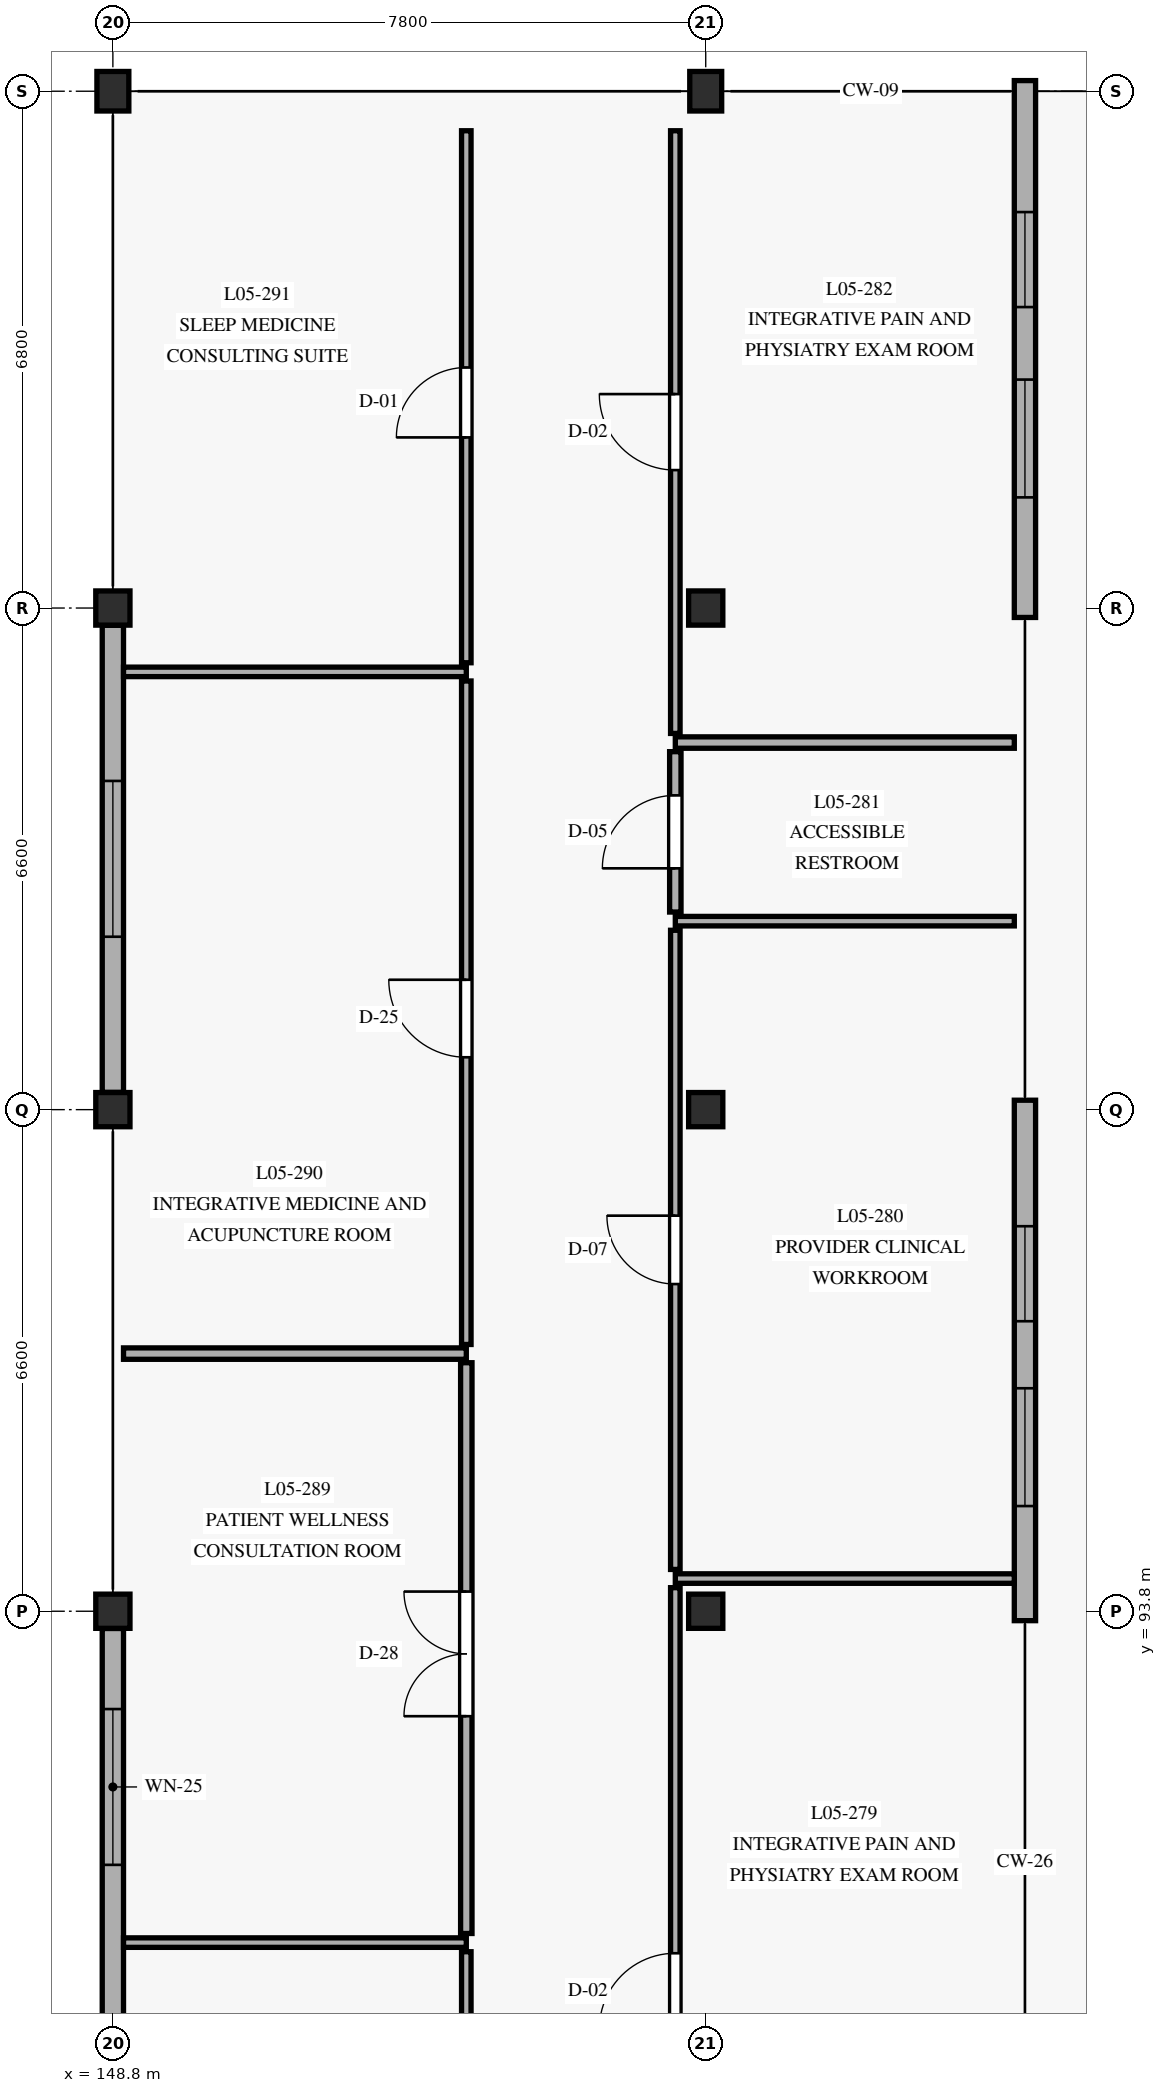
"""IFC4 building model, lengths in metres.
Left out: names, types, materials, properties, quantities, classifications, styles, units other than length and angle.
Written with IfcOpenShell. Run it as: python <this file> out.ifc"""

import sys

from ifc_helpers import new_model, si_unit, direction, frame, frame_2d, origin, origin_with_axes, origin_2d, place, context, subcontext, project, spatial, rectangle, extrude, element, fill, save


model = new_model("IFC4")
c1 = context("Model", 3, precision=1e-05, world=origin(), true_north=direction((0.0, 1.0)))
c2 = subcontext(c1, "Body", "Model", "MODEL_VIEW")
j1 = project(units=[si_unit("LENGTHUNIT", "METRE"), si_unit("PLANEANGLEUNIT", "RADIAN")], contexts=[c1])
p1 = place(None, origin())
s1 = spatial("IfcSite", under=j1, at=p1, CompositionType="ELEMENT")
p2 = place(p1, origin())
s2 = spatial("IfcBuilding", under=s1, at=p2, CompositionType="ELEMENT")
p3 = place(p2, frame((0.0, 0.0, 17.55)))
s3 = spatial("IfcBuildingStorey", under=s2, at=p3, CompositionType="ELEMENT", Elevation=17.55)
for number, where, z_axis, x_axis in (
    (1, (148.8, 93.8, 0.0), (0.0, 0.0, 1.0), (1.0, 0.0, 0.0)),
    (2, (148.8, 100.4, 0.0), (0.0, 0.0, 1.0), (1.0, 0.0, 0.0)),
    (3, (148.8, 107.0, 0.0), (0.0, 0.0, 1.0), (1.0, 0.0, 0.0)),
):
    element("IfcColumn", number, at=place(p3, frame(where, z_axis=z_axis, x_axis=x_axis)), inside=s3, PredefinedType="COLUMN", context=c2, shape_type="SweptSolid", body=[
        extrude(rectangle(XDim=0.45, YDim=0.45, at=origin_2d()), origin(), (0.0, 0.0, 1.0), 4.05),
    ])
p4 = place(p3, frame((148.8, 113.8, 0.0), z_axis=(0.0, 0.0, 1.0), x_axis=(1.0, 0.0, 0.0)))
e4 = element("IfcColumn", 4, at=p4, inside=s3, PredefinedType="COLUMN", context=c2, shape_type="SweptSolid", body=[
    extrude(rectangle(XDim=0.42, YDim=0.52, at=origin_2d()), origin(), (0.0, 0.0, 1.0), 4.05),
])
for number, where, z_axis, x_axis in (
    (5, (156.6, 93.8, 0.0), (0.0, 0.0, 1.0), (1.0, 0.0, 0.0)),
    (6, (156.6, 100.4, 0.0), (0.0, 0.0, 1.0), (1.0, 0.0, 0.0)),
    (7, (156.6, 107.0, 0.0), (0.0, 0.0, 1.0), (1.0, 0.0, 0.0)),
):
    element("IfcColumn", number, at=place(p3, frame(where, z_axis=z_axis, x_axis=x_axis)), inside=s3, PredefinedType="COLUMN", context=c2, shape_type="SweptSolid", body=[
        extrude(rectangle(XDim=0.45, YDim=0.45, at=origin_2d()), origin(), (0.0, 0.0, 1.0), 4.05),
    ])
p5 = place(p3, frame((156.6, 113.8, 0.0), z_axis=(0.0, 0.0, 1.0), x_axis=(1.0, 0.0, 0.0)))
e8 = element("IfcColumn", 8, at=p5, inside=s3, PredefinedType="COLUMN", context=c2, shape_type="SweptSolid", body=[
    extrude(rectangle(XDim=0.42, YDim=0.52, at=origin_2d()), origin(), (0.0, 0.0, 1.0), 4.05),
])
p6 = place(p3, frame((160.8, 93.676, 0.0), z_axis=(0.0, 0.0, 1.0), x_axis=(0.0, 1.0, 0.0)))
e9 = element("IfcWall", 9, at=p6, inside=s3, PredefinedType="SOLIDWALL", context=c2, shape_type="SweptSolid", body=[
    extrude(rectangle(XDim=6.848, YDim=0.28, at=frame_2d((3.424, 0.0))), origin(), (0.0, 0.0, 1.0), 3.84),
])
p7 = place(p6, frame((1.508, 0.0, 0.85)))
e10 = element("IfcOpeningElement", 10, at=p7, cuts=e9, PredefinedType="OPENING", context=c2, shape_type="SweptSolid", body=[
    extrude(rectangle(XDim=1.55, YDim=1.75, at=frame_2d((0.775, 0.875))), frame((0.0, 0.15, 0.0), z_axis=(0.0, -1.0, 0.0), x_axis=(1.0, 0.0, 0.0)), (0.0, 0.0, 1.0), 0.3),
])
p8 = place(p6, frame((3.94, 0.0, 0.85)))
e11 = element("IfcOpeningElement", 11, at=p8, cuts=e9, PredefinedType="OPENING", context=c2, shape_type="SweptSolid", body=[
    extrude(rectangle(XDim=1.25, YDim=1.75, at=frame_2d((0.625, 0.875))), frame((0.0, 0.15, 0.0), z_axis=(0.0, -1.0, 0.0), x_axis=(1.0, 0.0, 0.0)), (0.0, 0.0, 1.0), 0.3),
])
p9 = place(p3, frame((160.8, 106.876, 0.0), z_axis=(0.0, 0.0, 1.0), x_axis=(0.0, 1.0, 0.0)))
e12 = element("IfcWall", 12, at=p9, inside=s3, PredefinedType="SOLIDWALL", context=c2, shape_type="SweptSolid", body=[
    extrude(rectangle(XDim=7.064, YDim=0.28, at=frame_2d((3.532, 0.0))), origin(), (0.0, 0.0, 1.0), 3.84),
])
p10 = place(p9, frame((1.58, 0.0, 0.85)))
e13 = element("IfcOpeningElement", 13, at=p10, cuts=e12, PredefinedType="OPENING", context=c2, shape_type="SweptSolid", body=[
    extrude(rectangle(XDim=1.55, YDim=1.75, at=frame_2d((0.775, 0.875))), frame((0.0, 0.15, 0.0), z_axis=(0.0, -1.0, 0.0), x_axis=(1.0, 0.0, 0.0)), (0.0, 0.0, 1.0), 0.3),
])
p11 = place(p9, frame((4.084, 0.0, 0.85)))
e14 = element("IfcOpeningElement", 14, at=p11, cuts=e12, PredefinedType="OPENING", context=c2, shape_type="SweptSolid", body=[
    extrude(rectangle(XDim=1.25, YDim=1.75, at=frame_2d((0.625, 0.875))), frame((0.0, 0.15, 0.0), z_axis=(0.0, -1.0, 0.0), x_axis=(1.0, 0.0, 0.0)), (0.0, 0.0, 1.0), 0.3),
])
p12 = place(p3, frame((148.8, 93.573, 0.0), z_axis=(0.0, 0.0, 1.0), x_axis=(0.0, -1.0, 0.0)))
e15 = element("IfcWall", 15, at=p12, inside=s3, PredefinedType="SOLIDWALL", context=c2, shape_type="SweptSolid", body=[
    extrude(rectangle(XDim=6.146, YDim=0.28, at=frame_2d((3.073, 0.0))), origin(), (0.0, 0.0, 1.0), 3.46),
])
p13 = place(p12, frame((1.06, 0.0, 0.8)))
e16 = element("IfcOpeningElement", 16, at=p13, cuts=e15, PredefinedType="OPENING", context=c2, shape_type="SweptSolid", body=[
    extrude(rectangle(XDim=2.05, YDim=1.95, at=frame_2d((1.025, 0.975))), frame((0.0, 0.15, 0.0), z_axis=(0.0, -1.0, 0.0), x_axis=(1.0, 0.0, 0.0)), (0.0, 0.0, 1.0), 0.3),
])
p14 = place(p3, frame((148.8, 106.773, 0.0), z_axis=(0.0, 0.0, 1.0), x_axis=(0.0, -1.0, 0.0)))
e17 = element("IfcWall", 17, at=p14, inside=s3, PredefinedType="SOLIDWALL", context=c2, shape_type="SweptSolid", body=[
    extrude(rectangle(XDim=6.146, YDim=0.28, at=frame_2d((3.073, 0.0))), origin(), (0.0, 0.0, 1.0), 3.46),
])
p15 = place(p14, frame((2.048, 0.0, 0.8)))
e18 = element("IfcOpeningElement", 18, at=p15, cuts=e17, PredefinedType="OPENING", context=c2, shape_type="SweptSolid", body=[
    extrude(rectangle(XDim=2.05, YDim=1.95, at=frame_2d((1.025, 0.975))), frame((0.0, 0.15, 0.0), z_axis=(0.0, -1.0, 0.0), x_axis=(1.0, 0.0, 0.0)), (0.0, 0.0, 1.0), 0.3),
])
p16 = place(p3, frame((156.2, 83.49, 0.0), z_axis=(0.0, 0.0, 1.0), x_axis=(0.0, 1.0, 0.0)))
e19 = element("IfcWall", 19, at=p16, inside=s3, PredefinedType="PARTITIONING", context=c2, shape_type="SweptSolid", body=[
    extrude(rectangle(XDim=10.62, YDim=0.125, at=frame_2d((5.31, 0.0))), origin(), (0.0, 0.0, 1.0), 3.435),
])
p17 = place(p16, frame((4.81, 0.0, 0.0)))
e20 = element("IfcOpeningElement", 20, at=p17, cuts=e19, PredefinedType="OPENING", context=c2, shape_type="SweptSolid", body=[
    extrude(rectangle(XDim=1.0, YDim=2.15, at=frame_2d((0.5, 1.075))), frame((0.0, 0.073, 0.0), z_axis=(0.0, -1.0, 0.0), x_axis=(1.0, 0.0, 0.0)), (0.0, 0.0, 1.0), 0.145),
])
p18 = place(p3, frame((156.2, 94.23, 0.0), z_axis=(0.0, 0.0, 1.0), x_axis=(1.0, 0.0, 0.0)))
e21 = element("IfcWall", 21, at=p18, inside=s3, PredefinedType="PARTITIONING", context=c2, shape_type="SweptSolid", body=[
    extrude(rectangle(XDim=4.46, YDim=0.125, at=frame_2d((2.23, 0.0))), origin(), (0.0, 0.0, 1.0), 3.455),
])
p19 = place(p3, frame((156.2, 94.35, 0.0), z_axis=(0.0, 0.0, 1.0), x_axis=(0.0, 1.0, 0.0)))
e22 = element("IfcWall", 22, at=p19, inside=s3, PredefinedType="PARTITIONING", context=c2, shape_type="SweptSolid", body=[
    extrude(rectangle(XDim=8.41, YDim=0.125, at=frame_2d((4.205, 0.0))), origin(), (0.0, 0.0, 1.0), 3.435),
])
p20 = place(p19, frame((3.755, 0.0, 0.0)))
e23 = element("IfcOpeningElement", 23, at=p20, cuts=e22, PredefinedType="OPENING", context=c2, shape_type="SweptSolid", body=[
    extrude(rectangle(XDim=0.9, YDim=2.12, at=frame_2d((0.45, 1.06))), frame((0.0, 0.073, 0.0), z_axis=(0.0, -1.0, 0.0), x_axis=(1.0, 0.0, 0.0)), (0.0, 0.0, 1.0), 0.145),
])
p21 = place(p3, frame((156.2, 102.88, 0.0), z_axis=(0.0, 0.0, 1.0), x_axis=(1.0, 0.0, 0.0)))
e24 = element("IfcWall", 24, at=p21, inside=s3, PredefinedType="PARTITIONING", context=c2, shape_type="SweptSolid", body=[
    extrude(rectangle(XDim=4.46, YDim=0.125, at=frame_2d((2.23, 0.0))), origin(), (0.0, 0.0, 1.0), 3.455),
])
p22 = place(p3, frame((156.2, 103.0, 0.0), z_axis=(0.0, 0.0, 1.0), x_axis=(0.0, 1.0, 0.0)))
e25 = element("IfcWall", 25, at=p22, inside=s3, PredefinedType="PARTITIONING", context=c2, shape_type="SweptSolid", body=[
    extrude(rectangle(XDim=2.11, YDim=0.15, at=frame_2d((1.055, 0.0))), origin(), (0.0, 0.0, 1.0), 3.835),
])
p23 = place(p22, frame((0.575, 0.0, 0.0)))
e26 = element("IfcOpeningElement", 26, at=p23, cuts=e25, PredefinedType="OPENING", context=c2, shape_type="SweptSolid", body=[
    extrude(rectangle(XDim=0.96, YDim=2.1, at=frame_2d((0.48, 1.05))), frame((0.0, 0.085, 0.0), z_axis=(0.0, -1.0, 0.0), x_axis=(1.0, 0.0, 0.0)), (0.0, 0.0, 1.0), 0.17),
])
p24 = place(p3, frame((156.2, 105.23, 0.0), z_axis=(0.0, 0.0, 1.0), x_axis=(1.0, 0.0, 0.0)))
e27 = element("IfcWall", 27, at=p24, inside=s3, PredefinedType="PARTITIONING", context=c2, shape_type="SweptSolid", body=[
    extrude(rectangle(XDim=4.46, YDim=0.15, at=frame_2d((2.23, 0.0))), origin(), (0.0, 0.0, 1.0), 3.455),
])
p25 = place(p3, frame((156.2, 105.35, 0.0), z_axis=(0.0, 0.0, 1.0), x_axis=(0.0, 1.0, 0.0)))
e28 = element("IfcWall", 28, at=p25, inside=s3, PredefinedType="PARTITIONING", context=c2, shape_type="SweptSolid", body=[
    extrude(rectangle(XDim=7.93, YDim=0.125, at=frame_2d((3.965, 0.0))), origin(), (0.0, 0.0, 1.0), 3.435),
])
p26 = place(p25, frame((3.465, 0.0, 0.0)))
e29 = element("IfcOpeningElement", 29, at=p26, cuts=e28, PredefinedType="OPENING", context=c2, shape_type="SweptSolid", body=[
    extrude(rectangle(XDim=1.0, YDim=2.15, at=frame_2d((0.5, 1.075))), frame((0.0, 0.073, 0.0), z_axis=(0.0, -1.0, 0.0), x_axis=(1.0, 0.0, 0.0)), (0.0, 0.0, 1.0), 0.145),
])
p27 = place(p3, frame((153.45, 79.8, 0.0), z_axis=(0.0, 0.0, 1.0), x_axis=(0.0, 1.0, 0.0)))
e30 = element("IfcWall", 30, at=p27, inside=s3, PredefinedType="PARTITIONING", context=c2, shape_type="SweptSolid", body=[
    extrude(rectangle(XDim=9.52, YDim=0.125, at=frame_2d((4.76, 0.0))), origin(), (0.0, 0.0, 1.0), 3.435),
])
p28 = place(p27, frame((4.224, 0.0, 0.0)))
e31 = element("IfcOpeningElement", 31, at=p28, cuts=e30, PredefinedType="OPENING", context=c2, shape_type="SweptSolid", body=[
    extrude(rectangle(XDim=0.92, YDim=2.15, at=frame_2d((0.46, 1.075))), frame((0.0, 0.073, 0.0), z_axis=(0.0, -1.0, 0.0), x_axis=(1.0, 0.0, 0.0)), (0.0, 0.0, 1.0), 0.145),
])
p29 = place(p3, frame((148.94, 89.44, 0.0), z_axis=(0.0, 0.0, 1.0), x_axis=(1.0, 0.0, 0.0)))
e32 = element("IfcWall", 32, at=p29, inside=s3, PredefinedType="PARTITIONING", context=c2, shape_type="SweptSolid", body=[
    extrude(rectangle(XDim=4.51, YDim=0.125, at=frame_2d((2.255, 0.0))), origin(), (0.0, 0.0, 1.0), 3.455),
])
p30 = place(p3, frame((153.45, 89.56, 0.0), z_axis=(0.0, 0.0, 1.0), x_axis=(0.0, 1.0, 0.0)))
e33 = element("IfcWall", 33, at=p30, inside=s3, PredefinedType="PARTITIONING", context=c2, shape_type="SweptSolid", body=[
    extrude(rectangle(XDim=7.51, YDim=0.15, at=frame_2d((3.755, 0.0))), origin(), (0.0, 0.0, 1.0), 3.435),
])
p31 = place(p30, frame((2.859, 0.0, 0.0)))
e34 = element("IfcOpeningElement", 34, at=p31, cuts=e33, PredefinedType="OPENING", context=c2, shape_type="SweptSolid", body=[
    extrude(rectangle(XDim=1.64, YDim=2.32, at=frame_2d((0.82, 1.16))), frame((0.0, 0.085, 0.0), z_axis=(0.0, -1.0, 0.0), x_axis=(1.0, 0.0, 0.0)), (0.0, 0.0, 1.0), 0.17),
])
p32 = place(p3, frame((148.94, 97.19, 0.0), z_axis=(0.0, 0.0, 1.0), x_axis=(1.0, 0.0, 0.0)))
e35 = element("IfcWall", 35, at=p32, inside=s3, PredefinedType="PARTITIONING", context=c2, shape_type="SweptSolid", body=[
    extrude(rectangle(XDim=4.51, YDim=0.15, at=frame_2d((2.255, 0.0))), origin(), (0.0, 0.0, 1.0), 3.455),
])
p33 = place(p3, frame((153.45, 97.31, 0.0), z_axis=(0.0, 0.0, 1.0), x_axis=(0.0, 1.0, 0.0)))
e36 = element("IfcWall", 36, at=p33, inside=s3, PredefinedType="PARTITIONING", context=c2, shape_type="SweptSolid", body=[
    extrude(rectangle(XDim=8.73, YDim=0.125, at=frame_2d((4.365, 0.0))), origin(), (0.0, 0.0, 1.0), 3.435),
])
p34 = place(p33, frame((3.779, 0.0, 0.0)))
e37 = element("IfcOpeningElement", 37, at=p34, cuts=e36, PredefinedType="OPENING", context=c2, shape_type="SweptSolid", body=[
    extrude(rectangle(XDim=1.02, YDim=2.18, at=frame_2d((0.51, 1.09))), frame((0.0, 0.073, 0.0), z_axis=(0.0, -1.0, 0.0), x_axis=(1.0, 0.0, 0.0)), (0.0, 0.0, 1.0), 0.145),
])
p35 = place(p3, frame((148.94, 106.16, 0.0), z_axis=(0.0, 0.0, 1.0), x_axis=(1.0, 0.0, 0.0)))
e38 = element("IfcWall", 38, at=p35, inside=s3, PredefinedType="PARTITIONING", context=c2, shape_type="SweptSolid", body=[
    extrude(rectangle(XDim=4.51, YDim=0.125, at=frame_2d((2.255, 0.0))), origin(), (0.0, 0.0, 1.0), 3.455),
])
p36 = place(p3, frame((153.45, 106.28, 0.0), z_axis=(0.0, 0.0, 1.0), x_axis=(0.0, 1.0, 0.0)))
e39 = element("IfcWall", 39, at=p36, inside=s3, PredefinedType="PARTITIONING", context=c2, shape_type="SweptSolid", body=[
    extrude(rectangle(XDim=7.0, YDim=0.125, at=frame_2d((3.5, 0.0))), origin(), (0.0, 0.0, 1.0), 3.435),
])
p37 = place(p36, frame((2.965, 0.0, 0.0)))
e40 = element("IfcOpeningElement", 40, at=p37, cuts=e39, PredefinedType="OPENING", context=c2, shape_type="SweptSolid", body=[
    extrude(rectangle(XDim=0.92, YDim=2.15, at=frame_2d((0.46, 1.075))), frame((0.0, 0.073, 0.0), z_axis=(0.0, -1.0, 0.0), x_axis=(1.0, 0.0, 0.0)), (0.0, 0.0, 1.0), 0.145),
])
p38 = place(p7, origin_with_axes())
e41 = element("IfcWindow", 41, at=p38, inside=s3, PartitioningType="SINGLE_PANEL", PredefinedType="WINDOW", context=c2, shape_type="SweptSolid", body=[
    extrude(rectangle(XDim=1.55, YDim=1.75, at=frame_2d((0.775, 0.875))), frame((0.0, 0.03, 0.0), z_axis=(0.0, -1.0, 0.0), x_axis=(1.0, 0.0, 0.0)), (0.0, 0.0, 1.0), 0.06),
])
fill(e10, e41)
p39 = place(p8, origin_with_axes())
e42 = element("IfcWindow", 42, at=p39, inside=s3, PartitioningType="SINGLE_PANEL", PredefinedType="WINDOW", context=c2, shape_type="SweptSolid", body=[
    extrude(rectangle(XDim=1.25, YDim=1.75, at=frame_2d((0.625, 0.875))), frame((0.0, 0.03, 0.0), z_axis=(0.0, -1.0, 0.0), x_axis=(1.0, 0.0, 0.0)), (0.0, 0.0, 1.0), 0.06),
])
fill(e11, e42)
p40 = place(p10, origin_with_axes())
e43 = element("IfcWindow", 43, at=p40, inside=s3, PartitioningType="SINGLE_PANEL", PredefinedType="WINDOW", context=c2, shape_type="SweptSolid", body=[
    extrude(rectangle(XDim=1.55, YDim=1.75, at=frame_2d((0.775, 0.875))), frame((0.0, 0.03, 0.0), z_axis=(0.0, -1.0, 0.0), x_axis=(1.0, 0.0, 0.0)), (0.0, 0.0, 1.0), 0.06),
])
fill(e13, e43)
p41 = place(p11, origin_with_axes())
e44 = element("IfcWindow", 44, at=p41, inside=s3, PartitioningType="SINGLE_PANEL", PredefinedType="WINDOW", context=c2, shape_type="SweptSolid", body=[
    extrude(rectangle(XDim=1.25, YDim=1.75, at=frame_2d((0.625, 0.875))), frame((0.0, 0.03, 0.0), z_axis=(0.0, -1.0, 0.0), x_axis=(1.0, 0.0, 0.0)), (0.0, 0.0, 1.0), 0.06),
])
fill(e14, e44)
p42 = place(p13, origin_with_axes())
e45 = element("IfcWindow", 45, at=p42, inside=s3, PartitioningType="SINGLE_PANEL", PredefinedType="WINDOW", context=c2, shape_type="SweptSolid", body=[
    extrude(rectangle(XDim=2.05, YDim=1.95, at=frame_2d((1.025, 0.975))), frame((0.0, 0.03, 0.0), z_axis=(0.0, -1.0, 0.0), x_axis=(1.0, 0.0, 0.0)), (0.0, 0.0, 1.0), 0.06),
])
fill(e16, e45)
p43 = place(p15, origin_with_axes())
e46 = element("IfcWindow", 46, at=p43, inside=s3, PartitioningType="SINGLE_PANEL", PredefinedType="WINDOW", context=c2, shape_type="SweptSolid", body=[
    extrude(rectangle(XDim=2.05, YDim=1.95, at=frame_2d((1.025, 0.975))), frame((0.0, 0.03, 0.0), z_axis=(0.0, -1.0, 0.0), x_axis=(1.0, 0.0, 0.0)), (0.0, 0.0, 1.0), 0.06),
])
fill(e18, e46)
p44 = place(p17, frame((1.0, 0.0, 0.0), z_axis=(0.0, 0.0, 1.0), x_axis=(-1.0, 0.0, 0.0)))
e47 = element("IfcDoor", 47, at=p44, inside=s3, OperationType="SINGLE_SWING_RIGHT", PredefinedType="DOOR", context=c2, shape_type="SweptSolid", body=[
    extrude(rectangle(XDim=1.0, YDim=2.15, at=frame_2d((0.5, 1.075))), frame((0.0, 0.025, 0.0), z_axis=(0.0, -1.0, 0.0), x_axis=(1.0, 0.0, 0.0)), (0.0, 0.0, 1.0), 0.05),
])
fill(e20, e47)
p45 = place(p20, frame((0.9, 0.0, 0.0), z_axis=(0.0, 0.0, 1.0), x_axis=(-1.0, 0.0, 0.0)))
e48 = element("IfcDoor", 48, at=p45, inside=s3, OperationType="SINGLE_SWING_LEFT", PredefinedType="DOOR", context=c2, shape_type="SweptSolid", body=[
    extrude(rectangle(XDim=0.9, YDim=2.12, at=frame_2d((0.45, 1.06))), frame((0.0, 0.025, 0.0), z_axis=(0.0, -1.0, 0.0), x_axis=(1.0, 0.0, 0.0)), (0.0, 0.0, 1.0), 0.05),
])
fill(e23, e48)
p46 = place(p23, frame((0.96, 0.0, 0.0), z_axis=(0.0, 0.0, 1.0), x_axis=(-1.0, 0.0, 0.0)))
e49 = element("IfcDoor", 49, at=p46, inside=s3, OperationType="SINGLE_SWING_RIGHT", PredefinedType="DOOR", context=c2, shape_type="SweptSolid", body=[
    extrude(rectangle(XDim=0.96, YDim=2.1, at=frame_2d((0.48, 1.05))), frame((0.0, 0.025, 0.0), z_axis=(0.0, -1.0, 0.0), x_axis=(1.0, 0.0, 0.0)), (0.0, 0.0, 1.0), 0.05),
])
fill(e26, e49)
p47 = place(p26, frame((1.0, 0.0, 0.0), z_axis=(0.0, 0.0, 1.0), x_axis=(-1.0, 0.0, 0.0)))
e50 = element("IfcDoor", 50, at=p47, inside=s3, OperationType="SINGLE_SWING_LEFT", PredefinedType="DOOR", context=c2, shape_type="SweptSolid", body=[
    extrude(rectangle(XDim=1.0, YDim=2.15, at=frame_2d((0.5, 1.075))), frame((0.0, 0.025, 0.0), z_axis=(0.0, -1.0, 0.0), x_axis=(1.0, 0.0, 0.0)), (0.0, 0.0, 1.0), 0.05),
])
fill(e29, e50)
p48 = place(p31, origin_with_axes())
e51 = element("IfcDoor", 51, at=p48, inside=s3, OperationType="DOUBLE_DOOR_SINGLE_SWING", PredefinedType="DOOR", context=c2, shape_type="SweptSolid", body=[
    extrude(rectangle(XDim=1.64, YDim=2.32, at=frame_2d((0.82, 1.16))), frame((0.0, 0.025, 0.0), z_axis=(0.0, -1.0, 0.0), x_axis=(1.0, 0.0, 0.0)), (0.0, 0.0, 1.0), 0.05),
])
fill(e34, e51)
p49 = place(p34, origin_with_axes())
e52 = element("IfcDoor", 52, at=p49, inside=s3, OperationType="SINGLE_SWING_RIGHT", PredefinedType="DOOR", context=c2, shape_type="SweptSolid", body=[
    extrude(rectangle(XDim=1.02, YDim=2.18, at=frame_2d((0.51, 1.09))), frame((0.0, 0.025, 0.0), z_axis=(0.0, -1.0, 0.0), x_axis=(1.0, 0.0, 0.0)), (0.0, 0.0, 1.0), 0.05),
])
fill(e37, e52)
p50 = place(p37, origin_with_axes())
e53 = element("IfcDoor", 53, at=p50, inside=s3, OperationType="SINGLE_SWING_LEFT", PredefinedType="DOOR", context=c2, shape_type="SweptSolid", body=[
    extrude(rectangle(XDim=0.92, YDim=2.15, at=frame_2d((0.46, 1.075))), frame((0.0, 0.025, 0.0), z_axis=(0.0, -1.0, 0.0), x_axis=(1.0, 0.0, 0.0)), (0.0, 0.0, 1.0), 0.05),
])
fill(e40, e53)
save(model, sys.argv[1])
